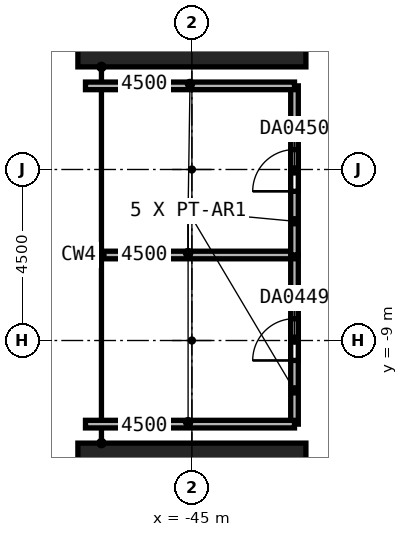
"""IFC4 building model, lengths in metres.
Left out: names, types, materials, properties, quantities, classifications, styles, units other than length and angle.
Written with IfcOpenShell. Run it as: python <this file> out.ifc"""

import sys

from ifc_helpers import new_model, si_unit, direction, frame, frame_2d, origin, origin_2d, place, context, subcontext, project, spatial, rectangle, extrude, element, fill, save


model = new_model("IFC4")
c1 = context("Model", 3, precision=1e-05, world=origin(), true_north=direction((0.0, 1.0)))
c2 = subcontext(c1, "Body", "Model", "MODEL_VIEW")
j1 = project(units=[si_unit("LENGTHUNIT", "METRE"), si_unit("PLANEANGLEUNIT", "RADIAN")], contexts=[c1])
p1 = place(None, origin())
s1 = spatial("IfcSite", under=j1, at=p1, CompositionType="ELEMENT")
p2 = place(p1, origin())
s2 = spatial("IfcBuilding", under=s1, at=p2, CompositionType="ELEMENT")
p3 = place(p2, frame((0.0, 0.0, 37.0)))
s3 = spatial("IfcBuildingStorey", under=s2, at=p3, CompositionType="ELEMENT", Elevation=37.0)
for number, where, z_axis, x_axis in (
    (1, (-45.0, -13.5, 0.0), (0.0, 0.0, 1.0), (0.0, 1.0, 0.0)),
    (2, (-45.0, 0.0, 0.0), (0.0, 0.0, 1.0), (0.0, 1.0, 0.0)),
):
    element("IfcColumn", number, at=place(p3, frame(where, z_axis=z_axis, x_axis=x_axis)), inside=s3, PredefinedType="COLUMN", context=c2, shape_type="SweptSolid", body=[
        extrude(rectangle(XDim=3.6, YDim=6.0, at=origin_2d()), origin(), (0.0, 0.0, 1.0), 5.8),
    ])
p4 = place(p3, frame((-42.3, -11.2, 0.0), z_axis=(0.0, 0.0, 1.0), x_axis=(0.0, 1.0, 0.0)))
e3 = element("IfcWall", 3, at=p4, inside=s3, PredefinedType="PARTITIONING", context=c2, shape_type="SweptSolid", body=[
    extrude(rectangle(XDim=4.45, YDim=0.2, at=frame_2d((2.225, 0.0))), origin(), (0.0, 0.0, 1.0), 6.7),
])
p5 = place(p4, frame((1.675, 0.0, 0.0)))
e4 = element("IfcOpeningElement", 4, at=p5, cuts=e3, PredefinedType="OPENING", context=c2, shape_type="SweptSolid", body=[
    extrude(rectangle(XDim=1.1, YDim=2.4, at=frame_2d((0.55, 1.2))), frame((0.0, 0.1, 0.0), z_axis=(0.0, -1.0, 0.0), x_axis=(1.0, 0.0, 0.0)), (0.0, 0.0, 1.0), 0.2),
])
for number, where, z_axis, x_axis in (
    (5, (-42.3, -11.2, 0.0), (0.0, 0.0, 1.0), (-1.0, 0.0, 0.0)),
    (6, (-47.8, -6.75, 0.0), (0.0, 0.0, 1.0), (1.0, 0.0, 0.0)),
):
    element("IfcWall", number, at=place(p3, frame(where, z_axis=z_axis, x_axis=x_axis)), inside=s3, PredefinedType="PARTITIONING", context=c2, shape_type="SweptSolid", body=[
        extrude(rectangle(XDim=5.5, YDim=0.2, at=frame_2d((2.75, 0.0))), origin(), (0.0, 0.0, 1.0), 6.7),
    ])
p6 = place(p3, frame((-42.3, -6.75, 0.0), z_axis=(0.0, 0.0, 1.0), x_axis=(0.0, 1.0, 0.0)))
e7 = element("IfcWall", 7, at=p6, inside=s3, PredefinedType="PARTITIONING", context=c2, shape_type="SweptSolid", body=[
    extrude(rectangle(XDim=4.45, YDim=0.2, at=frame_2d((2.225, 0.0))), origin(), (0.0, 0.0, 1.0), 6.7),
])
p7 = place(p6, frame((1.675, 0.0, 0.0)))
e8 = element("IfcOpeningElement", 8, at=p7, cuts=e7, PredefinedType="OPENING", context=c2, shape_type="SweptSolid", body=[
    extrude(rectangle(XDim=1.1, YDim=2.4, at=frame_2d((0.55, 1.2))), frame((0.0, 0.1, 0.0), z_axis=(0.0, -1.0, 0.0), x_axis=(1.0, 0.0, 0.0)), (0.0, 0.0, 1.0), 0.2),
])
p8 = place(p3, frame((-42.3, -2.3, 0.0), z_axis=(0.0, 0.0, 1.0), x_axis=(-1.0, 0.0, 0.0)))
e9 = element("IfcWall", 9, at=p8, inside=s3, PredefinedType="PARTITIONING", context=c2, shape_type="SweptSolid", body=[
    extrude(rectangle(XDim=5.5, YDim=0.2, at=frame_2d((2.75, 0.0))), origin(), (0.0, 0.0, 1.0), 6.7),
])
p9 = place(p5, origin())
e10 = element("IfcDoor", 10, at=p9, inside=s3, OperationType="DOUBLE_DOOR_SINGLE_SWING", PredefinedType="DOOR", context=c2, shape_type="SweptSolid", body=[
    extrude(rectangle(XDim=1.1, YDim=2.4, at=frame_2d((0.55, 1.2))), frame((0.0, 0.025, 0.0), z_axis=(0.0, -1.0, 0.0), x_axis=(1.0, 0.0, 0.0)), (0.0, 0.0, 1.0), 0.05),
])
fill(e4, e10)
p10 = place(p7, origin())
e11 = element("IfcDoor", 11, at=p10, inside=s3, OperationType="DOUBLE_DOOR_SINGLE_SWING", PredefinedType="DOOR", context=c2, shape_type="SweptSolid", body=[
    extrude(rectangle(XDim=1.1, YDim=2.4, at=frame_2d((0.55, 1.2))), frame((0.0, 0.025, 0.0), z_axis=(0.0, -1.0, 0.0), x_axis=(1.0, 0.0, 0.0)), (0.0, 0.0, 1.0), 0.05),
])
fill(e8, e11)
save(model, sys.argv[1])
